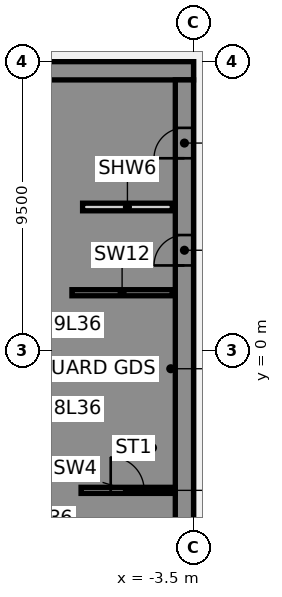
"""IFC4 building model, lengths in metres.
Left out: names, types, materials, properties, quantities, classifications, styles, units other than length and angle.
Written with IfcOpenShell. Run it as: python <this file> out.ifc"""

import sys

from ifc_helpers import new_model, si_unit, direction, frame, frame_2d, origin, place, context, subcontext, project, spatial, polyline, rectangle, outline, extrude, element, fill, save


model = new_model("IFC4")
c1 = context("Model", 3, precision=1e-05, world=origin(), true_north=direction((0.0, 1.0)))
c2 = subcontext(c1, "Body", "Model", "MODEL_VIEW")
j1 = project(units=[si_unit("LENGTHUNIT", "METRE"), si_unit("PLANEANGLEUNIT", "RADIAN")], contexts=[c1])
p1 = place(None, origin())
s1 = spatial("IfcSite", under=j1, at=p1, CompositionType="ELEMENT")
p2 = place(p1, origin())
s2 = spatial("IfcBuilding", under=s1, at=p2, CompositionType="ELEMENT")
p3 = place(p2, frame((0.0, 0.0, 148.0)))
s3 = spatial("IfcBuildingStorey", under=s2, at=p3, CompositionType="ELEMENT", Elevation=148.0)
p4 = place(p3, frame((-16.5, 9.2, 0.0), z_axis=(0.0, 0.0, 1.0), x_axis=(1.0, 0.0, 0.0)))
e1 = element("IfcWall", 1, at=p4, inside=s3, PredefinedType="SHEAR", context=c2, shape_type="SweptSolid", body=[
    extrude(rectangle(XDim=13.0, YDim=0.6, at=frame_2d((6.5, 0.0))), origin(), (0.0, 0.0, 1.0), 3.61),
])
p5 = place(p3, origin())
e2 = element("IfcWall", 2, at=p5, inside=s3, PredefinedType="SHEAR", context=c2, shape_type="SweptSolid", body=[
    extrude(outline(polyline([(-9.8, -5.375), (-9.8, -5.625), (-7.5, -5.625), (-7.2, -5.625), (-7.2, 8.9), (-7.5, 8.9), (-9.8, 8.9), (-9.8, 8.125), (-7.5, 8.125), (-7.5, 5.625), (-9.8, 5.625), (-9.8, 5.375), (-7.5, 5.375), (-7.5, 2.875), (-9.8, 2.875), (-9.8, 2.625), (-7.5, 2.625), (-7.5, 0.125), (-9.8, 0.125), (-9.8, -0.125), (-7.5, -0.125), (-7.5, -2.625), (-9.8, -2.625), (-9.8, -2.875), (-7.5, -2.875), (-7.5, -5.375), (-9.8, -5.375)])), origin(), (0.0, 0.0, 1.0), 3.61),
])
p6 = place(p3, frame((-7.5, 1.9, 0.0), z_axis=(0.0, 0.0, 1.0), x_axis=(1.0, 0.0, 0.0)))
e3 = element("IfcWall", 3, at=p6, inside=s3, PredefinedType="SHEAR", context=c2, shape_type="SweptSolid", body=[
    extrude(rectangle(XDim=3.3, YDim=0.2, at=frame_2d((1.65, 0.0))), origin(), (0.0, 0.0, 1.0), 3.61),
])
p7 = place(p3, frame((-3.8, -8.9, 0.0), z_axis=(0.0, 0.0, 1.0), x_axis=(0.0, 1.0, 0.0)))
e4 = element("IfcWall", 4, at=p7, inside=s3, PredefinedType="SHEAR", context=c2, shape_type="SweptSolid", body=[
    extrude(rectangle(XDim=17.8, YDim=0.6, at=frame_2d((8.9, 0.0))), origin(), (0.0, 0.0, 1.0), 3.61),
])
p8 = place(p7, frame((1.25, 0.0, 0.0)))
e5 = element("IfcOpeningElement", 5, at=p8, cuts=e4, PredefinedType="OPENING", context=c2, shape_type="SweptSolid", body=[
    extrude(rectangle(XDim=1.8, YDim=2.1, at=frame_2d((0.9, 1.05))), frame((0.0, 0.31, 0.0), z_axis=(0.0, -1.0, 0.0), x_axis=(1.0, 0.0, 0.0)), (0.0, 0.0, 1.0), 0.62),
])
p9 = place(p7, frame((11.698, 0.0, 0.0)))
e6 = element("IfcOpeningElement", 6, at=p9, cuts=e4, PredefinedType="OPENING", context=c2, shape_type="SweptSolid", body=[
    extrude(rectangle(XDim=1.0, YDim=2.1, at=frame_2d((0.5, 1.05))), frame((0.0, 0.31, 0.0), z_axis=(0.0, -1.0, 0.0), x_axis=(1.0, 0.0, 0.0)), (0.0, 0.0, 1.0), 0.62),
])
p10 = place(p7, frame((15.222, 0.0, 0.0)))
e7 = element("IfcOpeningElement", 7, at=p10, cuts=e4, PredefinedType="OPENING", context=c2, shape_type="SweptSolid", body=[
    extrude(rectangle(XDim=1.0, YDim=2.1, at=frame_2d((0.5, 1.05))), frame((0.0, 0.31, 0.0), z_axis=(0.0, -1.0, 0.0), x_axis=(1.0, 0.0, 0.0)), (0.0, 0.0, 1.0), 0.62),
])
p11 = place(p3, frame((-7.15, 4.72, 0.0), z_axis=(0.0, 0.0, 1.0), x_axis=(1.0, 0.0, 0.0)))
e8 = element("IfcWall", 8, at=p11, inside=s3, PredefinedType="PARTITIONING", context=c2, shape_type="SweptSolid", body=[
    extrude(rectangle(XDim=2.95, YDim=0.25, at=frame_2d((1.475, 0.0))), origin(), (0.0, 0.0, 1.0), 3.61),
])
p12 = place(p3, frame((-7.2, -4.6, 0.0), z_axis=(0.0, 0.0, 1.0), x_axis=(1.0, 0.0, 0.0)))
e9 = element("IfcWall", 9, at=p12, inside=s3, PredefinedType="SHEAR", context=c2, shape_type="SweptSolid", body=[
    extrude(rectangle(XDim=3.1, YDim=0.2, at=frame_2d((1.55, 0.0))), origin(), (0.0, 0.0, 1.0), 3.61),
])
p13 = place(p12, frame((0.975, 0.0, 0.0)))
e10 = element("IfcOpeningElement", 10, at=p13, cuts=e9, PredefinedType="OPENING", context=c2, shape_type="SweptSolid", body=[
    extrude(rectangle(XDim=1.1, YDim=2.1, at=frame_2d((0.55, 1.05))), frame((0.0, 0.11, 0.0), z_axis=(0.0, -1.0, 0.0), x_axis=(1.0, 0.0, 0.0)), (0.0, 0.0, 1.0), 0.22),
])
p14 = place(p9, origin())
e11 = element("IfcDoor", 11, at=p14, inside=s3, OperationType="SINGLE_SWING_LEFT", PredefinedType="DOOR", context=c2, shape_type="SweptSolid", body=[
    extrude(rectangle(XDim=1.0, YDim=2.1, at=frame_2d((0.5, 1.05))), frame((0.0, 0.275, 0.0), z_axis=(0.0, -1.0, 0.0), x_axis=(1.0, 0.0, 0.0)), (0.0, 0.0, 1.0), 0.05),
])
fill(e6, e11)
p15 = place(p10, origin())
e12 = element("IfcDoor", 12, at=p15, inside=s3, OperationType="SINGLE_SWING_LEFT", PredefinedType="DOOR", context=c2, shape_type="SweptSolid", body=[
    extrude(rectangle(XDim=1.0, YDim=2.1, at=frame_2d((0.5, 1.05))), frame((0.0, 0.275, 0.0), z_axis=(0.0, -1.0, 0.0), x_axis=(1.0, 0.0, 0.0)), (0.0, 0.0, 1.0), 0.05),
])
fill(e7, e12)
p16 = place(p13, origin())
e13 = element("IfcDoor", 13, at=p16, inside=s3, OperationType="SINGLE_SWING_LEFT", PredefinedType="DOOR", context=c2, shape_type="SweptSolid", body=[
    extrude(rectangle(XDim=1.1, YDim=2.1, at=frame_2d((0.55, 1.05))), frame((0.0, 0.025, 0.0), z_axis=(0.0, -1.0, 0.0), x_axis=(1.0, 0.0, 0.0)), (0.0, 0.0, 1.0), 0.05),
])
fill(e10, e13)
save(model, sys.argv[1])
